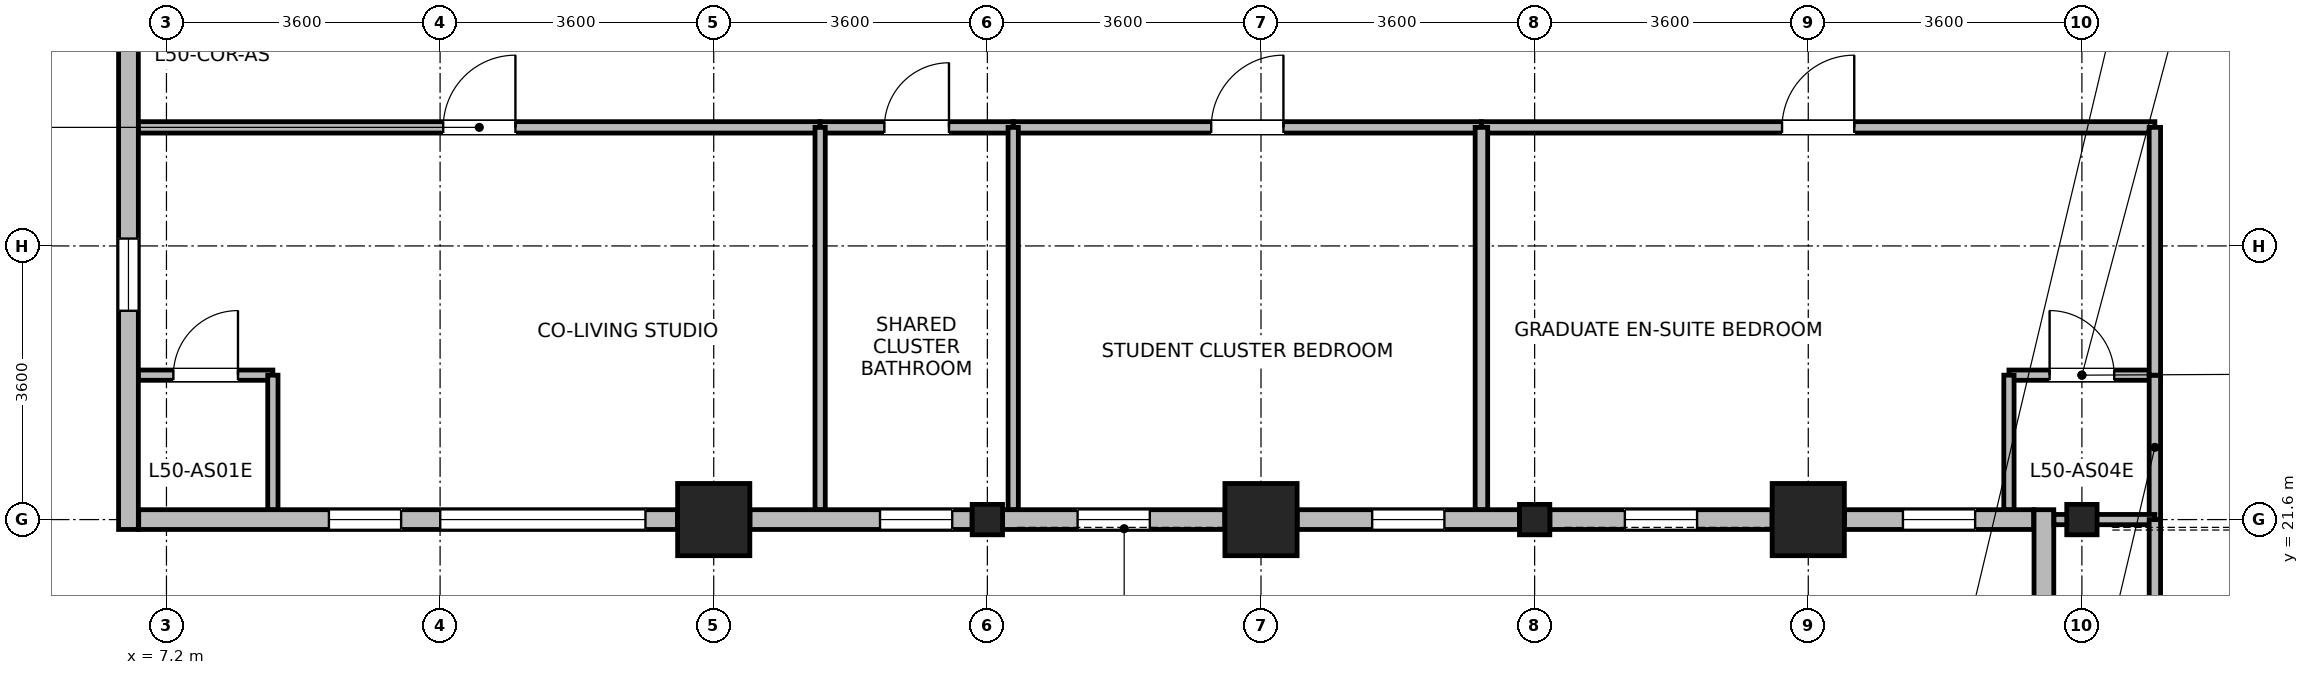
"""IFC4 building model, lengths in metres.
Left out: names, types, materials, properties, quantities, classifications, styles, units other than length and angle.
Written with IfcOpenShell. Run it as: python <this file> out.ifc"""

import sys

from ifc_helpers import new_model, si_unit, direction, frame, frame_2d, origin, origin_2d, place, context, subcontext, project, spatial, rectangle, i_section, extrude, source, transform, mapped, element, fill, save


model = new_model("IFC4")
c1 = context("Model", 3, precision=1e-05, world=origin(), true_north=direction((0.0, 1.0)))
c2 = subcontext(c1, "Body", "Model", "MODEL_VIEW")
j1 = project(units=[si_unit("LENGTHUNIT", "METRE"), si_unit("PLANEANGLEUNIT", "RADIAN")], contexts=[c1])
p1 = place(None, origin())
s1 = spatial("IfcSite", under=j1, at=p1, CompositionType="ELEMENT")
p2 = place(p1, origin())
s2 = spatial("IfcBuilding", under=s1, at=p2, CompositionType="ELEMENT")
p3 = place(p2, frame((0.0, 0.0, 197.2)))
s3 = spatial("IfcBuildingStorey", under=s2, at=p3, CompositionType="ELEMENT", Elevation=197.2)
m1 = source(origin(), c2, "Body", "SweptSolid", [
    extrude(rectangle(XDim=0.95, YDim=0.95, at=origin_2d()), origin(), (0.0, 0.0, 1.0), 4.6),
])
for number, where, z_axis, x_axis in (
    (1, (14.4, 21.6, 0.0), (0.0, 0.0, 1.0), (1.0, 0.0, 0.0)),
    (2, (21.6, 21.6, 0.0), (0.0, 0.0, 1.0), (1.0, 0.0, 0.0)),
    (3, (28.8, 21.6, 0.0), (0.0, 0.0, 1.0), (1.0, 0.0, 0.0)),
):
    element("IfcColumn", number, at=place(p3, frame(where, z_axis=z_axis, x_axis=x_axis)), inside=s3, PredefinedType="COLUMN", context=c2, shape_type="MappedRepresentation", body=[
        mapped(m1, transform((0.0, 0.0, 0.0), x_axis=(1.0, 0.0, 0.0), y_axis=(0.0, 1.0, 0.0), z_axis=(0.0, 0.0, 1.0), scale=1.0)),
    ])
m2 = source(origin(), c2, "Body", "SweptSolid", [
    extrude(i_section(OverallWidth=0.399, OverallDepth=0.4, WebThickness=0.017, FlangeThickness=0.023, FilletRadius=0.015, at=origin_2d()), origin(), (0.0, 0.0, 1.0), 4.6),
])
for number, where, z_axis, x_axis in (
    (4, (18.0, 21.6, 0.0), (0.0, 0.0, 1.0), (1.0, 0.0, 0.0)),
    (5, (25.2, 21.6, 0.0), (0.0, 0.0, 1.0), (1.0, 0.0, 0.0)),
    (6, (32.4, 21.6, 0.0), (0.0, 0.0, 1.0), (1.0, 0.0, 0.0)),
):
    element("IfcColumn", number, at=place(p3, frame(where, z_axis=z_axis, x_axis=x_axis)), inside=s3, PredefinedType="COLUMN", context=c2, shape_type="MappedRepresentation", body=[
        mapped(m2, transform((0.0, 0.0, 0.0), x_axis=(1.0, 0.0, 0.0), y_axis=(0.0, 1.0, 0.0), z_axis=(0.0, 0.0, 1.0), scale=1.0)),
    ])
p4 = place(p3, frame((6.7, 21.47, 0.0), z_axis=(0.0, 0.0, 1.0), x_axis=(0.0, 1.0, 0.0)))
e7 = element("IfcWall", 7, at=p4, inside=s3, PredefinedType="STANDARD", context=c2, shape_type="SweptSolid", body=[
    extrude(rectangle(XDim=6.704, YDim=0.26, at=frame_2d((3.352, 0.0))), origin(), (0.0, 0.0, 1.0), 4.35),
])
p5 = place(p4, frame((2.877, 0.0, 0.85)))
e8 = element("IfcOpeningElement", 8, at=p5, cuts=e7, PredefinedType="OPENING", context=c2, shape_type="SweptSolid", body=[
    extrude(rectangle(XDim=0.95, YDim=1.75, at=frame_2d((0.475, 0.875))), frame((0.0, 0.14, 0.0), z_axis=(0.0, -1.0, 0.0), x_axis=(1.0, 0.0, 0.0)), (0.0, 0.0, 1.0), 0.28),
])
p6 = place(p3, frame((13.924, 21.6, 0.0), z_axis=(0.0, 0.0, 1.0), x_axis=(-1.0, 0.0, 0.0)))
e9 = element("IfcWall", 9, at=p6, inside=s3, PredefinedType="STANDARD", context=c2, shape_type="SweptSolid", body=[
    extrude(rectangle(XDim=7.089, YDim=0.26, at=frame_2d((3.544, 0.0))), origin(), (0.0, 0.0, 1.0), 4.35),
])
p7 = place(p6, frame((0.422, 0.0, 0.85)))
e10 = element("IfcOpeningElement", 10, at=p7, cuts=e9, PredefinedType="OPENING", context=c2, shape_type="SweptSolid", body=[
    extrude(rectangle(XDim=2.7, YDim=2.05, at=frame_2d((1.35, 1.025))), frame((0.0, 0.14, 0.0), z_axis=(0.0, -1.0, 0.0), x_axis=(1.0, 0.0, 0.0)), (0.0, 0.0, 1.0), 0.28),
])
p8 = place(p6, frame((3.637, 0.0, 0.85)))
e11 = element("IfcOpeningElement", 11, at=p8, cuts=e9, PredefinedType="OPENING", context=c2, shape_type="SweptSolid", body=[
    extrude(rectangle(XDim=0.95, YDim=1.75, at=frame_2d((0.475, 0.875))), frame((0.0, 0.14, 0.0), z_axis=(0.0, -1.0, 0.0), x_axis=(1.0, 0.0, 0.0)), (0.0, 0.0, 1.0), 0.28),
])
p9 = place(p3, frame((17.8, 21.6, 0.0), z_axis=(0.0, 0.0, 1.0), x_axis=(-1.0, 0.0, 0.0)))
e12 = element("IfcWall", 12, at=p9, inside=s3, PredefinedType="STANDARD", context=c2, shape_type="SweptSolid", body=[
    extrude(rectangle(XDim=2.924, YDim=0.26, at=frame_2d((1.462, 0.0))), origin(), (0.0, 0.0, 1.0), 3.9),
])
p10 = place(p9, frame((0.262, 0.0, 0.85)))
e13 = element("IfcOpeningElement", 13, at=p10, cuts=e12, PredefinedType="OPENING", context=c2, shape_type="SweptSolid", body=[
    extrude(rectangle(XDim=0.95, YDim=1.75, at=frame_2d((0.475, 0.875))), frame((0.0, 0.14, 0.0), z_axis=(0.0, -1.0, 0.0), x_axis=(1.0, 0.0, 0.0)), (0.0, 0.0, 1.0), 0.28),
])
p11 = place(p3, frame((21.124, 21.6, 0.0), z_axis=(0.0, 0.0, 1.0), x_axis=(-1.0, 0.0, 0.0)))
e14 = element("IfcWall", 14, at=p11, inside=s3, PredefinedType="STANDARD", context=c2, shape_type="SweptSolid", body=[
    extrude(rectangle(XDim=2.924, YDim=0.26, at=frame_2d((1.462, 0.0))), origin(), (0.0, 0.0, 1.0), 3.9),
])
p12 = place(p11, frame((0.987, 0.0, 0.85)))
e15 = element("IfcOpeningElement", 15, at=p12, cuts=e14, PredefinedType="OPENING", context=c2, shape_type="SweptSolid", body=[
    extrude(rectangle(XDim=0.95, YDim=1.75, at=frame_2d((0.475, 0.875))), frame((0.0, 0.14, 0.0), z_axis=(0.0, -1.0, 0.0), x_axis=(1.0, 0.0, 0.0)), (0.0, 0.0, 1.0), 0.28),
])
p13 = place(p3, frame((25.0, 21.6, 0.0), z_axis=(0.0, 0.0, 1.0), x_axis=(-1.0, 0.0, 0.0)))
e16 = element("IfcWall", 16, at=p13, inside=s3, PredefinedType="STANDARD", context=c2, shape_type="SweptSolid", body=[
    extrude(rectangle(XDim=2.924, YDim=0.26, at=frame_2d((1.462, 0.0))), origin(), (0.0, 0.0, 1.0), 3.9),
])
p14 = place(p13, frame((0.987, 0.0, 0.85)))
e17 = element("IfcOpeningElement", 17, at=p14, cuts=e16, PredefinedType="OPENING", context=c2, shape_type="SweptSolid", body=[
    extrude(rectangle(XDim=0.95, YDim=1.75, at=frame_2d((0.475, 0.875))), frame((0.0, 0.14, 0.0), z_axis=(0.0, -1.0, 0.0), x_axis=(1.0, 0.0, 0.0)), (0.0, 0.0, 1.0), 0.28),
])
p15 = place(p3, frame((28.324, 21.6, 0.0), z_axis=(0.0, 0.0, 1.0), x_axis=(-1.0, 0.0, 0.0)))
e18 = element("IfcWall", 18, at=p15, inside=s3, PredefinedType="STANDARD", context=c2, shape_type="SweptSolid", body=[
    extrude(rectangle(XDim=2.924, YDim=0.26, at=frame_2d((1.462, 0.0))), origin(), (0.0, 0.0, 1.0), 3.9),
])
p16 = place(p15, frame((0.987, 0.0, 0.85)))
e19 = element("IfcOpeningElement", 19, at=p16, cuts=e18, PredefinedType="OPENING", context=c2, shape_type="SweptSolid", body=[
    extrude(rectangle(XDim=0.95, YDim=1.75, at=frame_2d((0.475, 0.875))), frame((0.0, 0.14, 0.0), z_axis=(0.0, -1.0, 0.0), x_axis=(1.0, 0.0, 0.0)), (0.0, 0.0, 1.0), 0.28),
])
p17 = place(p3, frame((31.765, 21.6, 0.0), z_axis=(0.0, 0.0, 1.0), x_axis=(-1.0, 0.0, 0.0)))
e20 = element("IfcWall", 20, at=p17, inside=s3, PredefinedType="STANDARD", context=c2, shape_type="SweptSolid", body=[
    extrude(rectangle(XDim=2.489, YDim=0.26, at=frame_2d((1.245, 0.0))), origin(), (0.0, 0.0, 1.0), 3.9),
])
p18 = place(p17, frame((0.77, 0.0, 0.85)))
e21 = element("IfcOpeningElement", 21, at=p18, cuts=e20, PredefinedType="OPENING", context=c2, shape_type="SweptSolid", body=[
    extrude(rectangle(XDim=0.95, YDim=1.75, at=frame_2d((0.475, 0.875))), frame((0.0, 0.14, 0.0), z_axis=(0.0, -1.0, 0.0), x_axis=(1.0, 0.0, 0.0)), (0.0, 0.0, 1.0), 0.28),
])
p19 = place(p3, frame((31.9, 5.67, 0.0), z_axis=(0.0, 0.0, 1.0), x_axis=(0.0, 1.0, 0.0)))
e22 = element("IfcWall", 22, at=p19, inside=s3, PredefinedType="STANDARD", context=c2, shape_type="SweptSolid", body=[
    extrude(rectangle(XDim=16.06, YDim=0.26, at=frame_2d((8.03, 0.0))), origin(), (0.0, 0.0, 1.0), 4.35),
])
p20 = place(p19, frame((3.468, 0.0, 0.85)))
e23 = element("IfcOpeningElement", 23, at=p20, cuts=e22, PredefinedType="OPENING", context=c2, shape_type="SweptSolid", body=[
    extrude(rectangle(XDim=2.7, YDim=2.05, at=frame_2d((1.35, 1.025))), frame((0.0, 0.14, 0.0), z_axis=(0.0, -1.0, 0.0), x_axis=(1.0, 0.0, 0.0)), (0.0, 0.0, 1.0), 0.28),
])
p21 = place(p19, frame((9.892, 0.0, 0.85)))
e24 = element("IfcOpeningElement", 24, at=p21, cuts=e22, PredefinedType="OPENING", context=c2, shape_type="SweptSolid", body=[
    extrude(rectangle(XDim=2.7, YDim=2.05, at=frame_2d((1.35, 1.025))), frame((0.0, 0.14, 0.0), z_axis=(0.0, -1.0, 0.0), x_axis=(1.0, 0.0, 0.0)), (0.0, 0.0, 1.0), 0.28),
])
p22 = place(p3, frame((31.44, 23.5, 0.0), z_axis=(0.0, 0.0, 1.0), x_axis=(1.0, 0.0, 0.0)))
e25 = element("IfcWall", 25, at=p22, inside=s3, PredefinedType="PARTITIONING", context=c2, shape_type="SweptSolid", body=[
    extrude(rectangle(XDim=1.92, YDim=0.135, at=frame_2d((0.96, 0.0))), origin(), (0.0, 0.0, 1.0), 4.35),
])
p23 = place(p22, frame((0.535, 0.0, 0.0)))
e26 = element("IfcOpeningElement", 26, at=p23, cuts=e25, PredefinedType="OPENING", context=c2, shape_type="SweptSolid", body=[
    extrude(rectangle(XDim=0.85, YDim=2.04, at=frame_2d((0.425, 1.02))), frame((0.0, 0.078, 0.0), z_axis=(0.0, -1.0, 0.0), x_axis=(1.0, 0.0, 0.0)), (0.0, 0.0, 1.0), 0.155),
])
p24 = place(p3, frame((6.832, 23.5, 0.0), z_axis=(0.0, 0.0, 1.0), x_axis=(1.0, 0.0, 0.0)))
e27 = element("IfcWall", 27, at=p24, inside=s3, PredefinedType="PARTITIONING", context=c2, shape_type="SweptSolid", body=[
    extrude(rectangle(XDim=1.768, YDim=0.135, at=frame_2d((0.884, 0.0))), origin(), (0.0, 0.0, 1.0), 4.35),
])
p25 = place(p24, frame((0.459, 0.0, 0.0)))
e28 = element("IfcOpeningElement", 28, at=p25, cuts=e27, PredefinedType="OPENING", context=c2, shape_type="SweptSolid", body=[
    extrude(rectangle(XDim=0.85, YDim=2.04, at=frame_2d((0.425, 1.02))), frame((0.0, 0.078, 0.0), z_axis=(0.0, -1.0, 0.0), x_axis=(1.0, 0.0, 0.0)), (0.0, 0.0, 1.0), 0.155),
])
for number, where, z_axis, x_axis in (
    (29, (8.6, 21.732, 0.0), (0.0, 0.0, 1.0), (0.0, 1.0, 0.0)),
    (30, (31.44, 21.732, 0.0), (0.0, 0.0, 1.0), (0.0, 1.0, 0.0)),
):
    element("IfcWall", number, at=place(p3, frame(where, z_axis=z_axis, x_axis=x_axis)), inside=s3, PredefinedType="PARTITIONING", context=c2, shape_type="SweptSolid", body=[
        extrude(rectangle(XDim=1.768, YDim=0.135, at=frame_2d((0.884, 0.0))), origin(), (0.0, 0.0, 1.0), 4.35),
    ])
p26 = place(p3, frame((33.36, 21.6, 0.0), z_axis=(0.0, 0.0, 1.0), x_axis=(0.0, 1.0, 0.0)))
e31 = element("IfcWall", 31, at=p26, inside=s3, PredefinedType="PARTITIONING", context=c2, shape_type="SweptSolid", body=[
    extrude(rectangle(XDim=1.9, YDim=0.15, at=frame_2d((0.95, 0.0))), origin(), (0.0, 0.0, 1.0), 4.35),
])
p27 = place(p3, frame((32.032, 21.6, 0.0), z_axis=(0.0, 0.0, 1.0), x_axis=(1.0, 0.0, 0.0)))
e32 = element("IfcWall", 32, at=p27, inside=s3, PredefinedType="PARTITIONING", context=c2, shape_type="SweptSolid", body=[
    extrude(rectangle(XDim=1.328, YDim=0.135, at=frame_2d((0.664, 0.0))), origin(), (0.0, 0.0, 1.0), 3.9),
])
p28 = place(p3, frame((6.832, 26.76, 0.0), z_axis=(0.0, 0.0, 1.0), x_axis=(1.0, 0.0, 0.0)))
e33 = element("IfcWall", 33, at=p28, inside=s3, PredefinedType="PARTITIONING", context=c2, shape_type="SweptSolid", body=[
    extrude(rectangle(XDim=8.968, YDim=0.15, at=frame_2d((4.484, 0.0))), origin(), (0.0, 0.0, 1.0), 4.35),
])
p29 = place(p28, frame((4.009, 0.0, 0.0)))
e34 = element("IfcOpeningElement", 34, at=p29, cuts=e33, PredefinedType="OPENING", context=c2, shape_type="SweptSolid", body=[
    extrude(rectangle(XDim=0.95, YDim=2.1, at=frame_2d((0.475, 1.05))), frame((0.0, 0.085, 0.0), z_axis=(0.0, -1.0, 0.0), x_axis=(1.0, 0.0, 0.0)), (0.0, 0.0, 1.0), 0.17),
])
p30 = place(p3, frame((24.5, 26.76, 0.0), z_axis=(0.0, 0.0, 1.0), x_axis=(1.0, 0.0, 0.0)))
e35 = element("IfcWall", 35, at=p30, inside=s3, PredefinedType="PARTITIONING", context=c2, shape_type="SweptSolid", body=[
    extrude(rectangle(XDim=8.86, YDim=0.15, at=frame_2d((4.43, 0.0))), origin(), (0.0, 0.0, 1.0), 4.35),
])
p31 = place(p30, frame((3.955, 0.0, 0.0)))
e36 = element("IfcOpeningElement", 36, at=p31, cuts=e35, PredefinedType="OPENING", context=c2, shape_type="SweptSolid", body=[
    extrude(rectangle(XDim=0.95, YDim=2.1, at=frame_2d((0.475, 1.05))), frame((0.0, 0.085, 0.0), z_axis=(0.0, -1.0, 0.0), x_axis=(1.0, 0.0, 0.0)), (0.0, 0.0, 1.0), 0.17),
])
p32 = place(p3, frame((33.36, 14.5, 0.0), z_axis=(0.0, 0.0, 1.0), x_axis=(0.0, 1.0, 0.0)))
e37 = element("IfcWall", 37, at=p32, inside=s3, PredefinedType="PARTITIONING", context=c2, shape_type="SweptSolid", body=[
    extrude(rectangle(XDim=7.1, YDim=0.15, at=frame_2d((3.55, 0.0))), origin(), (0.0, 0.0, 1.0), 4.35),
])
p33 = place(p32, frame((2.9, 0.0, 0.0)))
e38 = element("IfcOpeningElement", 38, at=p33, cuts=e37, PredefinedType="OPENING", context=c2, shape_type="SweptSolid", body=[
    extrude(rectangle(XDim=1.3, YDim=2.12, at=frame_2d((0.65, 1.06))), frame((0.0, 0.085, 0.0), z_axis=(0.0, -1.0, 0.0), x_axis=(1.0, 0.0, 0.0)), (0.0, 0.0, 1.0), 0.17),
])
p34 = place(p3, frame((18.34, 26.76, 0.0), z_axis=(0.0, 0.0, 1.0), x_axis=(1.0, 0.0, 0.0)))
e39 = element("IfcWall", 39, at=p34, inside=s3, PredefinedType="PARTITIONING", context=c2, shape_type="SweptSolid", body=[
    extrude(rectangle(XDim=6.16, YDim=0.15, at=frame_2d((3.08, 0.0))), origin(), (0.0, 0.0, 1.0), 4.35),
])
p35 = place(p34, frame((2.605, 0.0, 0.0)))
e40 = element("IfcOpeningElement", 40, at=p35, cuts=e39, PredefinedType="OPENING", context=c2, shape_type="SweptSolid", body=[
    extrude(rectangle(XDim=0.95, YDim=2.1, at=frame_2d((0.475, 1.05))), frame((0.0, 0.085, 0.0), z_axis=(0.0, -1.0, 0.0), x_axis=(1.0, 0.0, 0.0)), (0.0, 0.0, 1.0), 0.17),
])
p36 = place(p3, frame((33.36, 23.5, 0.0), z_axis=(0.0, 0.0, 1.0), x_axis=(0.0, 1.0, 0.0)))
e41 = element("IfcWall", 41, at=p36, inside=s3, PredefinedType="PARTITIONING", context=c2, shape_type="SweptSolid", body=[
    extrude(rectangle(XDim=3.26, YDim=0.15, at=frame_2d((1.63, 0.0))), origin(), (0.0, 0.0, 1.0), 4.35),
])
p37 = place(p3, frame((15.8, 26.76, 0.0), z_axis=(0.0, 0.0, 1.0), x_axis=(1.0, 0.0, 0.0)))
e42 = element("IfcWall", 42, at=p37, inside=s3, PredefinedType="PARTITIONING", context=c2, shape_type="SweptSolid", body=[
    extrude(rectangle(XDim=2.54, YDim=0.15, at=frame_2d((1.27, 0.0))), origin(), (0.0, 0.0, 1.0), 4.35),
])
p38 = place(p37, frame((0.845, 0.0, 0.0)))
e43 = element("IfcOpeningElement", 43, at=p38, cuts=e42, PredefinedType="OPENING", context=c2, shape_type="SweptSolid", body=[
    extrude(rectangle(XDim=0.85, YDim=2.04, at=frame_2d((0.425, 1.02))), frame((0.0, 0.085, 0.0), z_axis=(0.0, -1.0, 0.0), x_axis=(1.0, 0.0, 0.0)), (0.0, 0.0, 1.0), 0.17),
])
for number, where, z_axis, x_axis in (
    (44, (15.8, 21.732, 0.0), (0.0, 0.0, 1.0), (0.0, 1.0, 0.0)),
    (45, (18.34, 21.732, 0.0), (0.0, 0.0, 1.0), (0.0, 1.0, 0.0)),
):
    element("IfcWall", number, at=place(p3, frame(where, z_axis=z_axis, x_axis=x_axis)), inside=s3, PredefinedType="PARTITIONING", context=c2, shape_type="SweptSolid", body=[
        extrude(rectangle(XDim=5.028, YDim=0.135, at=frame_2d((2.514, 0.0))), origin(), (0.0, 0.0, 1.0), 4.35),
    ])
p39 = place(p3, frame((24.5, 21.732, 0.0), z_axis=(0.0, 0.0, 1.0), x_axis=(0.0, 1.0, 0.0)))
e46 = element("IfcWall", 46, at=p39, inside=s3, PredefinedType="PARTITIONING", context=c2, shape_type="SweptSolid", body=[
    extrude(rectangle(XDim=5.028, YDim=0.165, at=frame_2d((2.514, 0.0))), origin(), (0.0, 0.0, 1.0), 4.35),
])
p40 = place(p5, origin())
e47 = element("IfcWindow", 47, at=p40, inside=s3, PartitioningType="SINGLE_PANEL", PredefinedType="WINDOW", context=c2, shape_type="SweptSolid", body=[
    extrude(rectangle(XDim=0.95, YDim=1.75, at=frame_2d((0.475, 0.875))), frame((0.0, 0.03, 0.0), z_axis=(0.0, -1.0, 0.0), x_axis=(1.0, 0.0, 0.0)), (0.0, 0.0, 1.0), 0.06),
])
fill(e8, e47)
p41 = place(p7, origin())
e48 = element("IfcWindow", 48, at=p41, inside=s3, PartitioningType="SINGLE_PANEL", PredefinedType="WINDOW", context=c2, shape_type="SweptSolid", body=[
    extrude(rectangle(XDim=2.7, YDim=2.05, at=frame_2d((1.35, 1.025))), frame((0.0, 0.03, 0.0), z_axis=(0.0, -1.0, 0.0), x_axis=(1.0, 0.0, 0.0)), (0.0, 0.0, 1.0), 0.06),
])
fill(e10, e48)
p42 = place(p8, origin())
e49 = element("IfcWindow", 49, at=p42, inside=s3, PartitioningType="SINGLE_PANEL", PredefinedType="WINDOW", context=c2, shape_type="SweptSolid", body=[
    extrude(rectangle(XDim=0.95, YDim=1.75, at=frame_2d((0.475, 0.875))), frame((0.0, 0.03, 0.0), z_axis=(0.0, -1.0, 0.0), x_axis=(1.0, 0.0, 0.0)), (0.0, 0.0, 1.0), 0.06),
])
fill(e11, e49)
p43 = place(p10, origin())
e50 = element("IfcWindow", 50, at=p43, inside=s3, PartitioningType="SINGLE_PANEL", PredefinedType="WINDOW", context=c2, shape_type="SweptSolid", body=[
    extrude(rectangle(XDim=0.95, YDim=1.75, at=frame_2d((0.475, 0.875))), frame((0.0, 0.03, 0.0), z_axis=(0.0, -1.0, 0.0), x_axis=(1.0, 0.0, 0.0)), (0.0, 0.0, 1.0), 0.06),
])
fill(e13, e50)
p44 = place(p12, origin())
e51 = element("IfcWindow", 51, at=p44, inside=s3, PartitioningType="SINGLE_PANEL", PredefinedType="WINDOW", context=c2, shape_type="SweptSolid", body=[
    extrude(rectangle(XDim=0.95, YDim=1.75, at=frame_2d((0.475, 0.875))), frame((0.0, 0.03, 0.0), z_axis=(0.0, -1.0, 0.0), x_axis=(1.0, 0.0, 0.0)), (0.0, 0.0, 1.0), 0.06),
])
fill(e15, e51)
p45 = place(p14, origin())
e52 = element("IfcWindow", 52, at=p45, inside=s3, PartitioningType="SINGLE_PANEL", PredefinedType="WINDOW", context=c2, shape_type="SweptSolid", body=[
    extrude(rectangle(XDim=0.95, YDim=1.75, at=frame_2d((0.475, 0.875))), frame((0.0, 0.03, 0.0), z_axis=(0.0, -1.0, 0.0), x_axis=(1.0, 0.0, 0.0)), (0.0, 0.0, 1.0), 0.06),
])
fill(e17, e52)
p46 = place(p16, origin())
e53 = element("IfcWindow", 53, at=p46, inside=s3, PartitioningType="SINGLE_PANEL", PredefinedType="WINDOW", context=c2, shape_type="SweptSolid", body=[
    extrude(rectangle(XDim=0.95, YDim=1.75, at=frame_2d((0.475, 0.875))), frame((0.0, 0.03, 0.0), z_axis=(0.0, -1.0, 0.0), x_axis=(1.0, 0.0, 0.0)), (0.0, 0.0, 1.0), 0.06),
])
fill(e19, e53)
p47 = place(p18, origin())
e54 = element("IfcWindow", 54, at=p47, inside=s3, PartitioningType="SINGLE_PANEL", PredefinedType="WINDOW", context=c2, shape_type="SweptSolid", body=[
    extrude(rectangle(XDim=0.95, YDim=1.75, at=frame_2d((0.475, 0.875))), frame((0.0, 0.03, 0.0), z_axis=(0.0, -1.0, 0.0), x_axis=(1.0, 0.0, 0.0)), (0.0, 0.0, 1.0), 0.06),
])
fill(e21, e54)
p48 = place(p23, origin())
e55 = element("IfcDoor", 55, at=p48, inside=s3, OperationType="SINGLE_SWING_LEFT", PredefinedType="DOOR", context=c2, shape_type="SweptSolid", body=[
    extrude(rectangle(XDim=0.85, YDim=2.04, at=frame_2d((0.425, 1.02))), frame((0.0, 0.025, 0.0), z_axis=(0.0, -1.0, 0.0), x_axis=(1.0, 0.0, 0.0)), (0.0, 0.0, 1.0), 0.05),
])
fill(e26, e55)
p49 = place(p25, origin())
e56 = element("IfcDoor", 56, at=p49, inside=s3, OperationType="SINGLE_SWING_RIGHT", PredefinedType="DOOR", context=c2, shape_type="SweptSolid", body=[
    extrude(rectangle(XDim=0.85, YDim=2.04, at=frame_2d((0.425, 1.02))), frame((0.0, 0.025, 0.0), z_axis=(0.0, -1.0, 0.0), x_axis=(1.0, 0.0, 0.0)), (0.0, 0.0, 1.0), 0.05),
])
fill(e28, e56)
p50 = place(p29, origin())
e57 = element("IfcDoor", 57, at=p50, inside=s3, OperationType="SINGLE_SWING_RIGHT", PredefinedType="DOOR", context=c2, shape_type="SweptSolid", body=[
    extrude(rectangle(XDim=0.95, YDim=2.1, at=frame_2d((0.475, 1.05))), frame((0.0, 0.025, 0.0), z_axis=(0.0, -1.0, 0.0), x_axis=(1.0, 0.0, 0.0)), (0.0, 0.0, 1.0), 0.05),
])
fill(e34, e57)
p51 = place(p31, origin())
e58 = element("IfcDoor", 58, at=p51, inside=s3, OperationType="SINGLE_SWING_RIGHT", PredefinedType="DOOR", context=c2, shape_type="SweptSolid", body=[
    extrude(rectangle(XDim=0.95, YDim=2.1, at=frame_2d((0.475, 1.05))), frame((0.0, 0.025, 0.0), z_axis=(0.0, -1.0, 0.0), x_axis=(1.0, 0.0, 0.0)), (0.0, 0.0, 1.0), 0.05),
])
fill(e36, e58)
p52 = place(p35, origin())
e59 = element("IfcDoor", 59, at=p52, inside=s3, OperationType="SINGLE_SWING_RIGHT", PredefinedType="DOOR", context=c2, shape_type="SweptSolid", body=[
    extrude(rectangle(XDim=0.95, YDim=2.1, at=frame_2d((0.475, 1.05))), frame((0.0, 0.025, 0.0), z_axis=(0.0, -1.0, 0.0), x_axis=(1.0, 0.0, 0.0)), (0.0, 0.0, 1.0), 0.05),
])
fill(e40, e59)
p53 = place(p38, origin())
e60 = element("IfcDoor", 60, at=p53, inside=s3, OperationType="SINGLE_SWING_RIGHT", PredefinedType="DOOR", context=c2, shape_type="SweptSolid", body=[
    extrude(rectangle(XDim=0.85, YDim=2.04, at=frame_2d((0.425, 1.02))), frame((0.0, 0.025, 0.0), z_axis=(0.0, -1.0, 0.0), x_axis=(1.0, 0.0, 0.0)), (0.0, 0.0, 1.0), 0.05),
])
fill(e43, e60)
save(model, sys.argv[1])
